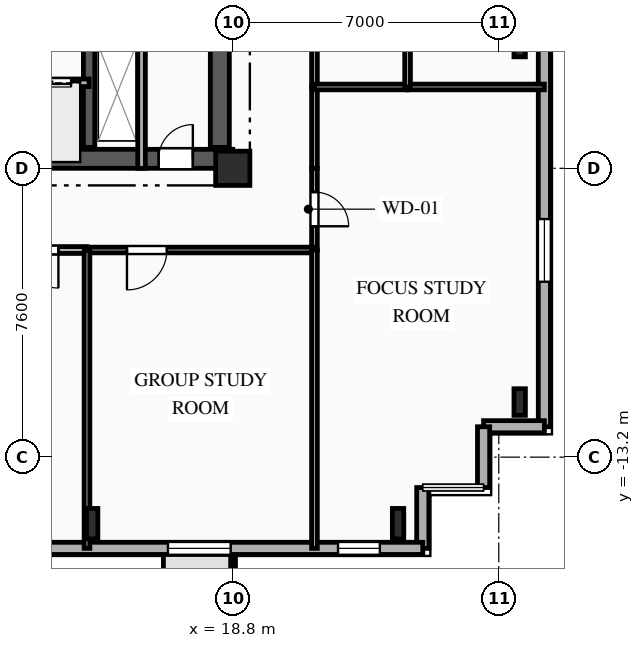
"""IFC4 building model, lengths in metres.
Left out: names, types, materials, properties, quantities, classifications, styles, units other than length and angle.
Written with IfcOpenShell. Run it as: python <this file> out.ifc"""

import sys

from ifc_helpers import new_model, si_unit, direction, frame, frame_2d, origin, origin_2d, place, context, subcontext, project, spatial, rectangle, i_section, extrude, element, fill, save


model = new_model("IFC4")
c1 = context("Model", 3, precision=1e-05, world=origin(), true_north=direction((0.0, 1.0)))
c2 = subcontext(c1, "Body", "Model", "MODEL_VIEW")
j1 = project(units=[si_unit("LENGTHUNIT", "METRE"), si_unit("PLANEANGLEUNIT", "RADIAN")], contexts=[c1])
p1 = place(None, origin())
s1 = spatial("IfcSite", under=j1, at=p1, CompositionType="ELEMENT")
p2 = place(p1, origin())
s2 = spatial("IfcBuilding", under=s1, at=p2, CompositionType="ELEMENT")
p3 = place(p2, frame((0.0, 0.0, 147.75)))
s3 = spatial("IfcBuildingStorey", under=s2, at=p3, CompositionType="ELEMENT", Elevation=147.75)
p4 = place(p3, frame((18.8, -5.6, 0.0), z_axis=(0.0, 0.0, 1.0), x_axis=(1.0, 0.0, 0.0)))
e1 = element("IfcColumn", 1, at=p4, inside=s3, PredefinedType="COLUMN", context=c2, shape_type="SweptSolid", body=[
    extrude(rectangle(XDim=0.9, YDim=0.9, at=origin_2d()), origin(), (0.0, 0.0, 1.0), 3.35),
])
for number, where, z_axis, x_axis in (
    (2, (15.1, -14.95, 0.0), (0.0, 0.0, 1.0), (1.0, 0.0, 0.0)),
    (3, (23.15, -14.95, 0.0), (0.0, 0.0, 1.0), (1.0, 0.0, 0.0)),
):
    element("IfcColumn", number, at=place(p3, frame(where, z_axis=z_axis, x_axis=x_axis)), inside=s3, PredefinedType="COLUMN", context=c2, shape_type="SweptSolid", body=[
        extrude(i_section(OverallWidth=0.3, OverallDepth=0.8, WebThickness=0.018, FlangeThickness=0.033, FilletRadius=0.03, at=origin_2d()), origin(), (0.0, 0.0, 1.0), 3.35),
    ])
for number, where, z_axis, x_axis in (
    (4, (26.35, -11.75, 0.0), (0.0, 0.0, 1.0), (1.0, 0.0, 0.0)),
    (5, (26.35, -2.317, 0.0), (0.0, 0.0, 1.0), (1.0, 0.0, 0.0)),
):
    element("IfcColumn", number, at=place(p3, frame(where, z_axis=z_axis, x_axis=x_axis)), inside=s3, PredefinedType="COLUMN", context=c2, shape_type="SweptSolid", body=[
        extrude(i_section(OverallWidth=0.3, OverallDepth=0.7, WebThickness=0.017, FlangeThickness=0.032, FilletRadius=0.027, at=origin_2d()), origin(), (0.0, 0.0, 1.0), 3.35),
    ])
p5 = place(p3, frame((27.0, 17.2, 0.0), z_axis=(0.0, 0.0, 1.0), x_axis=(0.0, -1.0, 0.0)))
e6 = element("IfcWall", 6, at=p5, inside=s3, PredefinedType="SOLIDWALL", context=c2, shape_type="SweptSolid", body=[
    extrude(rectangle(XDim=29.6, YDim=0.32, at=frame_2d((14.8, 0.0))), origin(), (0.0, 0.0, 1.0), 3.04),
])
p6 = place(p5, frame((3.895, 0.0, 0.85)))
e7 = element("IfcOpeningElement", 7, at=p6, cuts=e6, PredefinedType="OPENING", context=c2, shape_type="SweptSolid", body=[
    extrude(rectangle(XDim=1.65, YDim=1.85, at=frame_2d((0.825, 0.925))), frame((0.0, 0.17, 0.0), z_axis=(0.0, -1.0, 0.0), x_axis=(1.0, 0.0, 0.0)), (0.0, 0.0, 1.0), 0.34),
])
p7 = place(p5, frame((13.74, 0.0, 0.85)))
e8 = element("IfcOpeningElement", 8, at=p7, cuts=e6, PredefinedType="OPENING", context=c2, shape_type="SweptSolid", body=[
    extrude(rectangle(XDim=2.2, YDim=1.85, at=frame_2d((1.1, 0.925))), frame((0.0, 0.17, 0.0), z_axis=(0.0, -1.0, 0.0), x_axis=(1.0, 0.0, 0.0)), (0.0, 0.0, 1.0), 0.34),
])
p8 = place(p5, frame((24.135, 0.0, 0.85)))
e9 = element("IfcOpeningElement", 9, at=p8, cuts=e6, PredefinedType="OPENING", context=c2, shape_type="SweptSolid", body=[
    extrude(rectangle(XDim=1.65, YDim=1.85, at=frame_2d((0.825, 0.925))), frame((0.0, 0.17, 0.0), z_axis=(0.0, -1.0, 0.0), x_axis=(1.0, 0.0, 0.0)), (0.0, 0.0, 1.0), 0.34),
])
for number, where, z_axis, x_axis in (
    (10, (27.0, -12.4, 0.0), (0.0, 0.0, 1.0), (-1.0, 0.0, 0.0)),
    (11, (25.4, -12.4, 0.0), (0.0, 0.0, 1.0), (0.0, -1.0, 0.0)),
    (12, (23.8, -14.0, 0.0), (0.0, 0.0, 1.0), (0.0, -1.0, 0.0)),
):
    element("IfcWall", number, at=place(p3, frame(where, z_axis=z_axis, x_axis=x_axis)), inside=s3, PredefinedType="SOLIDWALL", context=c2, shape_type="SweptSolid", body=[
        extrude(rectangle(XDim=1.6, YDim=0.32, at=frame_2d((0.8, 0.0))), origin(), (0.0, 0.0, 1.0), 3.04),
    ])
p9 = place(p3, frame((23.8, -15.6, 0.0), z_axis=(0.0, 0.0, 1.0), x_axis=(-1.0, 0.0, 0.0)))
e13 = element("IfcWall", 13, at=p9, inside=s3, PredefinedType="SOLIDWALL", context=c2, shape_type="SweptSolid", body=[
    extrude(rectangle(XDim=49.6, YDim=0.32, at=frame_2d((24.8, 0.0))), origin(), (0.0, 0.0, 1.0), 3.04),
])
p10 = place(p9, frame((1.13, 0.0, 0.85)))
e14 = element("IfcOpeningElement", 14, at=p10, cuts=e13, PredefinedType="OPENING", context=c2, shape_type="SweptSolid", body=[
    extrude(rectangle(XDim=1.1, YDim=1.85, at=frame_2d((0.55, 0.925))), frame((0.0, 0.17, 0.0), z_axis=(0.0, -1.0, 0.0), x_axis=(1.0, 0.0, 0.0)), (0.0, 0.0, 1.0), 0.34),
])
p11 = place(p9, frame((5.055, 0.0, 0.85)))
e15 = element("IfcOpeningElement", 15, at=p11, cuts=e13, PredefinedType="OPENING", context=c2, shape_type="SweptSolid", body=[
    extrude(rectangle(XDim=1.65, YDim=1.85, at=frame_2d((0.825, 0.925))), frame((0.0, 0.17, 0.0), z_axis=(0.0, -1.0, 0.0), x_axis=(1.0, 0.0, 0.0)), (0.0, 0.0, 1.0), 0.34),
])
p12 = place(p9, frame((10.78, 0.0, 0.85)))
e16 = element("IfcOpeningElement", 16, at=p12, cuts=e13, PredefinedType="OPENING", context=c2, shape_type="SweptSolid", body=[
    extrude(rectangle(XDim=2.2, YDim=1.85, at=frame_2d((1.1, 0.925))), frame((0.0, 0.17, 0.0), z_axis=(0.0, -1.0, 0.0), x_axis=(1.0, 0.0, 0.0)), (0.0, 0.0, 1.0), 0.34),
])
p13 = place(p9, frame((17.284, 0.0, 0.85)))
e17 = element("IfcOpeningElement", 17, at=p13, cuts=e13, PredefinedType="OPENING", context=c2, shape_type="SweptSolid", body=[
    extrude(rectangle(XDim=2.2, YDim=1.85, at=frame_2d((1.1, 0.925))), frame((0.0, 0.17, 0.0), z_axis=(0.0, -1.0, 0.0), x_axis=(1.0, 0.0, 0.0)), (0.0, 0.0, 1.0), 0.34),
])
p14 = place(p9, frame((22.248, 0.0, 0.85)))
e18 = element("IfcOpeningElement", 18, at=p14, cuts=e13, PredefinedType="OPENING", context=c2, shape_type="SweptSolid", body=[
    extrude(rectangle(XDim=2.2, YDim=1.85, at=frame_2d((1.1, 0.925))), frame((0.0, 0.17, 0.0), z_axis=(0.0, -1.0, 0.0), x_axis=(1.0, 0.0, 0.0)), (0.0, 0.0, 1.0), 0.34),
])
p15 = place(p9, frame((28.7, 0.0, 0.85)))
e19 = element("IfcOpeningElement", 19, at=p15, cuts=e13, PredefinedType="OPENING", context=c2, shape_type="SweptSolid", body=[
    extrude(rectangle(XDim=2.2, YDim=1.85, at=frame_2d((1.1, 0.925))), frame((0.0, 0.17, 0.0), z_axis=(0.0, -1.0, 0.0), x_axis=(1.0, 0.0, 0.0)), (0.0, 0.0, 1.0), 0.34),
])
p16 = place(p9, frame((34.7, 0.0, 0.85)))
e20 = element("IfcOpeningElement", 20, at=p16, cuts=e13, PredefinedType="OPENING", context=c2, shape_type="SweptSolid", body=[
    extrude(rectangle(XDim=2.2, YDim=1.85, at=frame_2d((1.1, 0.925))), frame((0.0, 0.17, 0.0), z_axis=(0.0, -1.0, 0.0), x_axis=(1.0, 0.0, 0.0)), (0.0, 0.0, 1.0), 0.34),
])
p17 = place(p9, frame((41.492, 0.0, 0.85)))
e21 = element("IfcOpeningElement", 21, at=p17, cuts=e13, PredefinedType="OPENING", context=c2, shape_type="SweptSolid", body=[
    extrude(rectangle(XDim=1.65, YDim=1.85, at=frame_2d((0.825, 0.925))), frame((0.0, 0.17, 0.0), z_axis=(0.0, -1.0, 0.0), x_axis=(1.0, 0.0, 0.0)), (0.0, 0.0, 1.0), 0.34),
])
p18 = place(p9, frame((46.175, 0.0, 0.85)))
e22 = element("IfcOpeningElement", 22, at=p18, cuts=e13, PredefinedType="OPENING", context=c2, shape_type="SweptSolid", body=[
    extrude(rectangle(XDim=1.65, YDim=1.85, at=frame_2d((0.825, 0.925))), frame((0.0, 0.17, 0.0), z_axis=(0.0, -1.0, 0.0), x_axis=(1.0, 0.0, 0.0)), (0.0, 0.0, 1.0), 0.34),
])
p19 = place(p3, frame((9.2, -5.35, 0.0), z_axis=(0.0, 0.0, 1.0), x_axis=(1.0, 0.0, 0.0)))
e23 = element("IfcWall", 23, at=p19, inside=s3, PredefinedType="SHEAR", context=c2, shape_type="SweptSolid", body=[
    extrude(rectangle(XDim=9.6, YDim=0.5, at=frame_2d((4.8, 0.0))), origin(), (0.0, 0.0, 1.0), 3.04),
])
p20 = place(p19, frame((7.65, 0.0, 0.0)))
e24 = element("IfcOpeningElement", 24, at=p20, cuts=e23, PredefinedType="OPENING", context=c2, shape_type="SweptSolid", body=[
    extrude(rectangle(XDim=0.9, YDim=2.1, at=frame_2d((0.45, 1.05))), frame((0.0, 0.26, 0.0), z_axis=(0.0, -1.0, 0.0), x_axis=(1.0, 0.0, 0.0)), (0.0, 0.0, 1.0), 0.52),
])
p21 = place(p3, frame((18.46, -5.05, 0.0), z_axis=(0.0, 0.0, 1.0), x_axis=(0.0, 1.0, 0.0)))
e25 = element("IfcWall", 25, at=p21, inside=s3, PredefinedType="SHEAR", context=c2, shape_type="SweptSolid", body=[
    extrude(rectangle(XDim=10.1, YDim=0.5, at=frame_2d((5.05, 0.0))), origin(), (0.0, 0.0, 1.0), 3.04),
])
p22 = place(p3, frame((15.02, -5.05, 0.0), z_axis=(0.0, 0.0, 1.0), x_axis=(0.0, 1.0, 0.0)))
e26 = element("IfcWall", 26, at=p22, inside=s3, PredefinedType="SHEAR", context=c2, shape_type="SweptSolid", body=[
    extrude(rectangle(XDim=10.1, YDim=0.3, at=frame_2d((5.05, 0.0))), origin(), (0.0, 0.0, 1.0), 3.04),
])
p23 = place(p3, frame((16.4, -2.11, 0.0), z_axis=(0.0, 0.0, 1.0), x_axis=(0.0, -1.0, 0.0)))
e27 = element("IfcWall", 27, at=p23, inside=s3, PredefinedType="PARTITIONING", context=c2, shape_type="SweptSolid", body=[
    extrude(rectangle(XDim=3.49, YDim=0.2, at=frame_2d((1.745, 0.0))), origin(), (0.0, 0.0, 1.0), 3.04),
])
p24 = place(p3, frame((13.02, -3.35, 0.0), z_axis=(0.0, 0.0, 1.0), x_axis=(1.0, 0.0, 0.0)))
e28 = element("IfcWall", 28, at=p24, inside=s3, PredefinedType="PARTITIONING", context=c2, shape_type="SweptSolid", body=[
    extrude(rectangle(XDim=2.0, YDim=0.2, at=frame_2d((1.0, 0.0))), origin(), (0.0, 0.0, 1.0), 3.04),
])
p25 = place(p24, frame((0.475, 0.0, 0.0)))
e29 = element("IfcOpeningElement", 29, at=p25, cuts=e28, PredefinedType="OPENING", context=c2, shape_type="SweptSolid", body=[
    extrude(rectangle(XDim=1.05, YDim=2.1, at=frame_2d((0.525, 1.05))), frame((0.0, 0.11, 0.0), z_axis=(0.0, -1.0, 0.0), x_axis=(1.0, 0.0, 0.0)), (0.0, 0.0, 1.0), 0.22),
])
p26 = place(p3, frame((20.95, -5.6, 0.0), z_axis=(0.0, 0.0, 1.0), x_axis=(0.0, -1.0, 0.0)))
e30 = element("IfcWall", 30, at=p26, inside=s3, PredefinedType="PARTITIONING", context=c2, shape_type="SweptSolid", body=[
    extrude(rectangle(XDim=2.15, YDim=0.15, at=frame_2d((1.075, 0.0))), origin(), (0.0, 0.0, 1.0), 3.04),
])
p27 = place(p26, frame((0.625, 0.0, 0.0)))
e31 = element("IfcOpeningElement", 31, at=p27, cuts=e30, PredefinedType="OPENING", context=c2, shape_type="SweptSolid", body=[
    extrude(rectangle(XDim=0.9, YDim=2.1, at=frame_2d((0.45, 1.05))), frame((0.0, 0.085, 0.0), z_axis=(0.0, -1.0, 0.0), x_axis=(1.0, 0.0, 0.0)), (0.0, 0.0, 1.0), 0.17),
])
p28 = place(p3, frame((14.964, -7.75, 0.0), z_axis=(0.0, 0.0, 1.0), x_axis=(-1.0, 0.0, 0.0)))
e32 = element("IfcWall", 32, at=p28, inside=s3, PredefinedType="PARTITIONING", context=c2, shape_type="SweptSolid", body=[
    extrude(rectangle(XDim=3.535, YDim=0.18, at=frame_2d((1.768, 0.0))), origin(), (0.0, 0.0, 1.0), 3.04),
])
p29 = place(p28, frame((0.752, 0.0, 0.0)))
e33 = element("IfcOpeningElement", 33, at=p29, cuts=e32, PredefinedType="OPENING", context=c2, shape_type="SweptSolid", body=[
    extrude(rectangle(XDim=1.0, YDim=2.15, at=frame_2d((0.5, 1.075))), frame((0.0, 0.1, 0.0), z_axis=(0.0, -1.0, 0.0), x_axis=(1.0, 0.0, 0.0)), (0.0, 0.0, 1.0), 0.2),
])
p30 = place(p3, frame((20.95, -7.75, 0.0), z_axis=(0.0, 0.0, 1.0), x_axis=(-1.0, 0.0, 0.0)))
e34 = element("IfcWall", 34, at=p30, inside=s3, PredefinedType="PARTITIONING", context=c2, shape_type="SweptSolid", body=[
    extrude(rectangle(XDim=5.986, YDim=0.15, at=frame_2d((2.993, 0.0))), origin(), (0.0, 0.0, 1.0), 3.04),
])
p31 = place(p30, frame((3.884, 0.0, 0.0)))
e35 = element("IfcOpeningElement", 35, at=p31, cuts=e34, PredefinedType="OPENING", context=c2, shape_type="SweptSolid", body=[
    extrude(rectangle(XDim=1.05, YDim=2.15, at=frame_2d((0.525, 1.075))), frame((0.0, 0.085, 0.0), z_axis=(0.0, -1.0, 0.0), x_axis=(1.0, 0.0, 0.0)), (0.0, 0.0, 1.0), 0.17),
])
p32 = place(p3, frame((20.95, -3.46, 0.0), z_axis=(0.0, 0.0, 1.0), x_axis=(0.0, -1.0, 0.0)))
e36 = element("IfcWall", 36, at=p32, inside=s3, PredefinedType="PARTITIONING", context=c2, shape_type="SweptSolid", body=[
    extrude(rectangle(XDim=2.14, YDim=0.15, at=frame_2d((1.07, 0.0))), origin(), (0.0, 0.0, 1.0), 3.04),
])
p33 = place(p3, frame((20.95, -1.31, 0.0), z_axis=(0.0, 0.0, 1.0), x_axis=(0.0, -1.0, 0.0)))
e37 = element("IfcWall", 37, at=p33, inside=s3, PredefinedType="PLUMBINGWALL", context=c2, shape_type="SweptSolid", body=[
    extrude(rectangle(XDim=2.15, YDim=0.15, at=frame_2d((1.075, 0.0))), origin(), (0.0, 0.0, 1.0), 3.04),
])
p34 = place(p3, frame((23.4, -3.46, 0.0), z_axis=(0.0, 0.0, 1.0), x_axis=(1.0, 0.0, 0.0)))
e38 = element("IfcWall", 38, at=p34, inside=s3, PredefinedType="PARTITIONING", context=c2, shape_type="SweptSolid", body=[
    extrude(rectangle(XDim=3.6, YDim=0.15, at=frame_2d((1.8, 0.0))), origin(), (0.0, 0.0, 1.0), 3.04),
])
p35 = place(p3, frame((20.95, -3.46, 0.0), z_axis=(0.0, 0.0, 1.0), x_axis=(1.0, 0.0, 0.0)))
e39 = element("IfcWall", 39, at=p35, inside=s3, PredefinedType="PLUMBINGWALL", context=c2, shape_type="SweptSolid", body=[
    extrude(rectangle(XDim=2.45, YDim=0.15, at=frame_2d((1.225, 0.0))), origin(), (0.0, 0.0, 1.0), 3.04),
])
p36 = place(p3, frame((20.95, -15.6, 0.0), z_axis=(0.0, 0.0, 1.0), x_axis=(0.0, 1.0, 0.0)))
e40 = element("IfcWall", 40, at=p36, inside=s3, PredefinedType="PARTITIONING", context=c2, shape_type="SweptSolid", body=[
    extrude(rectangle(XDim=7.85, YDim=0.15, at=frame_2d((3.925, 0.0))), origin(), (0.0, 0.0, 1.0), 3.04),
])
p37 = place(p3, frame((23.4, -3.46, 0.0), z_axis=(0.0, 0.0, 1.0), x_axis=(0.0, 1.0, 0.0)))
e41 = element("IfcWall", 41, at=p37, inside=s3, PredefinedType="PLUMBINGWALL", context=c2, shape_type="SweptSolid", body=[
    extrude(rectangle(XDim=2.15, YDim=0.15, at=frame_2d((1.075, 0.0))), origin(), (0.0, 0.0, 1.0), 3.04),
])
p38 = place(p3, frame((14.964, -7.75, 0.0), z_axis=(0.0, 0.0, 1.0), x_axis=(0.0, -1.0, 0.0)))
e42 = element("IfcWall", 42, at=p38, inside=s3, PredefinedType="PARTITIONING", context=c2, shape_type="SweptSolid", body=[
    extrude(rectangle(XDim=7.85, YDim=0.15, at=frame_2d((3.925, 0.0))), origin(), (0.0, 0.0, 1.0), 3.04),
])
p39 = place(p8, origin())
e43 = element("IfcWindow", 43, at=p39, inside=s3, PartitioningType="SINGLE_PANEL", PredefinedType="WINDOW", context=c2, shape_type="SweptSolid", body=[
    extrude(rectangle(XDim=1.65, YDim=1.85, at=frame_2d((0.825, 0.925))), frame((0.0, 0.03, 0.0), z_axis=(0.0, -1.0, 0.0), x_axis=(1.0, 0.0, 0.0)), (0.0, 0.0, 1.0), 0.06),
])
fill(e9, e43)
p40 = place(p10, origin())
e44 = element("IfcWindow", 44, at=p40, inside=s3, PartitioningType="SINGLE_PANEL", PredefinedType="WINDOW", context=c2, shape_type="SweptSolid", body=[
    extrude(rectangle(XDim=1.1, YDim=1.85, at=frame_2d((0.55, 0.925))), frame((0.0, 0.03, 0.0), z_axis=(0.0, -1.0, 0.0), x_axis=(1.0, 0.0, 0.0)), (0.0, 0.0, 1.0), 0.06),
])
fill(e14, e44)
p41 = place(p11, origin())
e45 = element("IfcWindow", 45, at=p41, inside=s3, PartitioningType="SINGLE_PANEL", PredefinedType="WINDOW", context=c2, shape_type="SweptSolid", body=[
    extrude(rectangle(XDim=1.65, YDim=1.85, at=frame_2d((0.825, 0.925))), frame((0.0, 0.03, 0.0), z_axis=(0.0, -1.0, 0.0), x_axis=(1.0, 0.0, 0.0)), (0.0, 0.0, 1.0), 0.06),
])
fill(e15, e45)
p42 = place(p20, origin())
e46 = element("IfcDoor", 46, at=p42, inside=s3, OperationType="SINGLE_SWING_RIGHT", PredefinedType="DOOR", context=c2, shape_type="SweptSolid", body=[
    extrude(rectangle(XDim=0.9, YDim=2.1, at=frame_2d((0.45, 1.05))), frame((0.0, 0.025, 0.0), z_axis=(0.0, -1.0, 0.0), x_axis=(1.0, 0.0, 0.0)), (0.0, 0.0, 1.0), 0.05),
])
fill(e24, e46)
p43 = place(p25, origin())
e47 = element("IfcDoor", 47, at=p43, inside=s3, OperationType="DOUBLE_DOOR_SLIDING", PredefinedType="DOOR", context=c2, shape_type="SweptSolid", body=[
    extrude(rectangle(XDim=1.05, YDim=2.1, at=frame_2d((0.525, 1.05))), frame((0.0, 0.025, 0.0), z_axis=(0.0, -1.0, 0.0), x_axis=(1.0, 0.0, 0.0)), (0.0, 0.0, 1.0), 0.05),
])
fill(e29, e47)
p44 = place(p27, origin())
e48 = element("IfcDoor", 48, at=p44, inside=s3, OperationType="SINGLE_SWING_RIGHT", PredefinedType="DOOR", context=c2, shape_type="SweptSolid", body=[
    extrude(rectangle(XDim=0.9, YDim=2.1, at=frame_2d((0.45, 1.05))), frame((0.0, 0.025, 0.0), z_axis=(0.0, -1.0, 0.0), x_axis=(1.0, 0.0, 0.0)), (0.0, 0.0, 1.0), 0.05),
])
fill(e31, e48)
p45 = place(p29, origin())
e49 = element("IfcDoor", 49, at=p45, inside=s3, OperationType="SINGLE_SWING_LEFT", PredefinedType="DOOR", context=c2, shape_type="SweptSolid", body=[
    extrude(rectangle(XDim=1.0, YDim=2.15, at=frame_2d((0.5, 1.075))), frame((0.0, 0.025, 0.0), z_axis=(0.0, -1.0, 0.0), x_axis=(1.0, 0.0, 0.0)), (0.0, 0.0, 1.0), 0.05),
])
fill(e33, e49)
p46 = place(p31, origin())
e50 = element("IfcDoor", 50, at=p46, inside=s3, OperationType="SINGLE_SWING_RIGHT", PredefinedType="DOOR", context=c2, shape_type="SweptSolid", body=[
    extrude(rectangle(XDim=1.05, YDim=2.15, at=frame_2d((0.525, 1.075))), frame((0.0, 0.025, 0.0), z_axis=(0.0, -1.0, 0.0), x_axis=(1.0, 0.0, 0.0)), (0.0, 0.0, 1.0), 0.05),
])
fill(e35, e50)
save(model, sys.argv[1])
